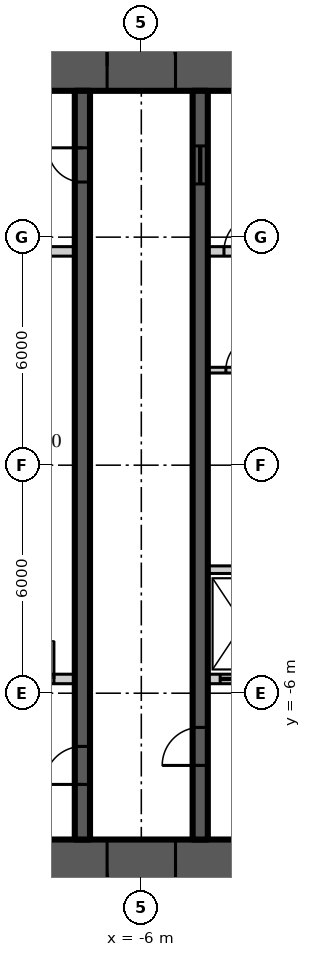
"""IFC4 building model, lengths in metres.
Left out: names, types, materials, properties, quantities, classifications, styles, units other than length and angle.
Written with IfcOpenShell. Run it as: python <this file> out.ifc"""

import sys

from ifc_helpers import new_model, si_unit, direction, frame, frame_2d, origin, place, context, subcontext, project, spatial, rectangle, extrude, element, fill, save


model = new_model("IFC4")
c1 = context("Model", 3, precision=1e-05, world=origin(), true_north=direction((0.0, 1.0)))
c2 = subcontext(c1, "Body", "Model", "MODEL_VIEW")
j1 = project(units=[si_unit("LENGTHUNIT", "METRE"), si_unit("PLANEANGLEUNIT", "RADIAN")], contexts=[c1])
p1 = place(None, origin())
s1 = spatial("IfcSite", under=j1, at=p1, CompositionType="ELEMENT")
p2 = place(p1, origin())
s2 = spatial("IfcBuilding", under=s1, at=p2, CompositionType="ELEMENT")
p3 = place(p2, frame((0.0, 0.0, 240.0)))
s3 = spatial("IfcBuildingStorey", under=s2, at=p3, CompositionType="ELEMENT", Elevation=240.0)
p4 = place(p3, frame((-11.15, 10.5, 0.0), z_axis=(0.0, 0.0, 1.0), x_axis=(1.0, 0.0, 0.0)))
e1 = element("IfcWall", 1, at=p4, inside=s3, PredefinedType="SHEAR", context=c2, shape_type="SweptSolid", body=[
    extrude(rectangle(XDim=22.3, YDim=1.3, at=frame_2d((11.15, 0.0))), origin(), (0.0, 0.0, 1.0), 3.9),
])
p5 = place(p4, frame((4.25, 0.0, 0.0)))
e2 = element("IfcOpeningElement", 2, at=p5, cuts=e1, PredefinedType="OPENING", context=c2, shape_type="SweptSolid", body=[
    extrude(rectangle(XDim=1.8, YDim=2.2, at=frame_2d((0.9, 1.1))), frame((0.0, 0.66, 0.0), z_axis=(0.0, -1.0, 0.0), x_axis=(1.0, 0.0, 0.0)), (0.0, 0.0, 1.0), 1.32),
])
p6 = place(p4, frame((16.25, 0.0, 0.0)))
e3 = element("IfcOpeningElement", 3, at=p6, cuts=e1, PredefinedType="OPENING", context=c2, shape_type="SweptSolid", body=[
    extrude(rectangle(XDim=1.8, YDim=2.2, at=frame_2d((0.9, 1.1))), frame((0.0, 0.66, 0.0), z_axis=(0.0, -1.0, 0.0), x_axis=(1.0, 0.0, 0.0)), (0.0, 0.0, 1.0), 1.32),
])
p7 = place(p3, frame((11.15, -10.5, 0.0), z_axis=(0.0, 0.0, 1.0), x_axis=(-1.0, 0.0, 0.0)))
e4 = element("IfcWall", 4, at=p7, inside=s3, PredefinedType="SHEAR", context=c2, shape_type="SweptSolid", body=[
    extrude(rectangle(XDim=22.3, YDim=1.3, at=frame_2d((11.15, 0.0))), origin(), (0.0, 0.0, 1.0), 3.9),
])
p8 = place(p7, frame((16.25, 0.0, 0.0)))
e5 = element("IfcOpeningElement", 5, at=p8, cuts=e4, PredefinedType="OPENING", context=c2, shape_type="SweptSolid", body=[
    extrude(rectangle(XDim=1.8, YDim=2.2, at=frame_2d((0.9, 1.1))), frame((0.0, 0.66, 0.0), z_axis=(0.0, -1.0, 0.0), x_axis=(1.0, 0.0, 0.0)), (0.0, 0.0, 1.0), 1.32),
])
p9 = place(p7, frame((4.25, 0.0, 0.0)))
e6 = element("IfcOpeningElement", 6, at=p9, cuts=e4, PredefinedType="OPENING", context=c2, shape_type="SweptSolid", body=[
    extrude(rectangle(XDim=1.8, YDim=2.2, at=frame_2d((0.9, 1.1))), frame((0.0, 0.66, 0.0), z_axis=(0.0, -1.0, 0.0), x_axis=(1.0, 0.0, 0.0)), (0.0, 0.0, 1.0), 1.32),
])
p10 = place(p3, frame((-7.55, -9.85, 0.0), z_axis=(0.0, 0.0, 1.0), x_axis=(0.0, 1.0, 0.0)))
e7 = element("IfcWall", 7, at=p10, inside=s3, PredefinedType="SHEAR", context=c2, shape_type="SweptSolid", body=[
    extrude(rectangle(XDim=19.7, YDim=0.4, at=frame_2d((9.85, 0.0))), origin(), (0.0, 0.0, 1.0), 3.9),
])
p11 = place(p10, frame((1.45, 0.0, 0.0)))
e8 = element("IfcOpeningElement", 8, at=p11, cuts=e7, PredefinedType="OPENING", context=c2, shape_type="SweptSolid", body=[
    extrude(rectangle(XDim=1.0, YDim=2.2, at=frame_2d((0.5, 1.1))), frame((0.0, 0.21, 0.0), z_axis=(0.0, -1.0, 0.0), x_axis=(1.0, 0.0, 0.0)), (0.0, 0.0, 1.0), 0.42),
])
p12 = place(p10, frame((17.3, 0.0, 0.0)))
e9 = element("IfcOpeningElement", 9, at=p12, cuts=e7, PredefinedType="OPENING", context=c2, shape_type="SweptSolid", body=[
    extrude(rectangle(XDim=0.9, YDim=2.1, at=frame_2d((0.45, 1.05))), frame((0.0, 0.21, 0.0), z_axis=(0.0, -1.0, 0.0), x_axis=(1.0, 0.0, 0.0)), (0.0, 0.0, 1.0), 0.42),
])
p13 = place(p3, frame((-4.45, -9.85, 0.0), z_axis=(0.0, 0.0, 1.0), x_axis=(0.0, 1.0, 0.0)))
e10 = element("IfcWall", 10, at=p13, inside=s3, PredefinedType="SHEAR", context=c2, shape_type="SweptSolid", body=[
    extrude(rectangle(XDim=19.7, YDim=0.4, at=frame_2d((9.85, 0.0))), origin(), (0.0, 0.0, 1.0), 3.9),
])
p14 = place(p13, frame((1.95, 0.0, 0.0)))
e11 = element("IfcOpeningElement", 11, at=p14, cuts=e10, PredefinedType="OPENING", context=c2, shape_type="SweptSolid", body=[
    extrude(rectangle(XDim=1.0, YDim=2.2, at=frame_2d((0.5, 1.1))), frame((0.0, 0.21, 0.0), z_axis=(0.0, -1.0, 0.0), x_axis=(1.0, 0.0, 0.0)), (0.0, 0.0, 1.0), 0.42),
])
p15 = place(p13, frame((17.25, 0.0, 0.0)))
e12 = element("IfcOpeningElement", 12, at=p15, cuts=e10, PredefinedType="OPENING", context=c2, shape_type="SweptSolid", body=[
    extrude(rectangle(XDim=1.0, YDim=2.1, at=frame_2d((0.5, 1.05))), frame((0.0, 0.21, 0.0), z_axis=(0.0, -1.0, 0.0), x_axis=(1.0, 0.0, 0.0)), (0.0, 0.0, 1.0), 0.42),
])
p16 = place(p3, frame((-9.85, 5.625, 0.0), z_axis=(0.0, 0.0, 1.0), x_axis=(1.0, 0.0, 0.0)))
e13 = element("IfcWall", 13, at=p16, inside=s3, PredefinedType="SOLIDWALL", context=c2, shape_type="SweptSolid", body=[
    extrude(rectangle(XDim=2.1, YDim=0.25, at=frame_2d((1.05, 0.0))), origin(), (0.0, 0.0, 1.0), 3.7),
])
p17 = place(p3, frame((-4.25, 5.625, 0.0), z_axis=(0.0, 0.0, 1.0), x_axis=(1.0, 0.0, 0.0)))
e14 = element("IfcWall", 14, at=p17, inside=s3, PredefinedType="SOLIDWALL", context=c2, shape_type="SweptSolid", body=[
    extrude(rectangle(XDim=1.85, YDim=0.25, at=frame_2d((0.925, 0.0))), origin(), (0.0, 0.0, 1.0), 3.7),
])
p18 = place(p17, frame((0.425, 0.0, 0.0)))
e15 = element("IfcOpeningElement", 15, at=p18, cuts=e14, PredefinedType="OPENING", context=c2, shape_type="SweptSolid", body=[
    extrude(rectangle(XDim=1.0, YDim=2.2, at=frame_2d((0.5, 1.1))), frame((0.0, 0.135, 0.0), z_axis=(0.0, -1.0, 0.0), x_axis=(1.0, 0.0, 0.0)), (0.0, 0.0, 1.0), 0.27),
])
p19 = place(p3, frame((-9.85, -5.625, 0.0), z_axis=(0.0, 0.0, 1.0), x_axis=(1.0, 0.0, 0.0)))
e16 = element("IfcWall", 16, at=p19, inside=s3, PredefinedType="SOLIDWALL", context=c2, shape_type="SweptSolid", body=[
    extrude(rectangle(XDim=2.1, YDim=0.25, at=frame_2d((1.05, 0.0))), origin(), (0.0, 0.0, 1.0), 3.7),
])
p20 = place(p19, frame((0.55, 0.0, 0.0)))
e17 = element("IfcOpeningElement", 17, at=p20, cuts=e16, PredefinedType="OPENING", context=c2, shape_type="SweptSolid", body=[
    extrude(rectangle(XDim=1.0, YDim=2.2, at=frame_2d((0.5, 1.1))), frame((0.0, 0.135, 0.0), z_axis=(0.0, -1.0, 0.0), x_axis=(1.0, 0.0, 0.0)), (0.0, 0.0, 1.0), 0.27),
])
p21 = place(p3, frame((-4.25, -5.625, 0.0), z_axis=(0.0, 0.0, 1.0), x_axis=(1.0, 0.0, 0.0)))
e18 = element("IfcWall", 18, at=p21, inside=s3, PredefinedType="SOLIDWALL", context=c2, shape_type="SweptSolid", body=[
    extrude(rectangle(XDim=1.85, YDim=0.25, at=frame_2d((0.925, 0.0))), origin(), (0.0, 0.0, 1.0), 3.7),
])
p22 = place(p21, frame((0.325, 0.0, 0.0)))
e19 = element("IfcOpeningElement", 19, at=p22, cuts=e18, PredefinedType="OPENING", context=c2, shape_type="SweptSolid", body=[
    extrude(rectangle(XDim=1.2, YDim=2.2, at=frame_2d((0.6, 1.1))), frame((0.0, 0.135, 0.0), z_axis=(0.0, -1.0, 0.0), x_axis=(1.0, 0.0, 0.0)), (0.0, 0.0, 1.0), 0.27),
])
p23 = place(p3, frame((-4.25, -2.75, 0.0), z_axis=(0.0, 0.0, 1.0), x_axis=(1.0, 0.0, 0.0)))
e20 = element("IfcWall", 20, at=p23, inside=s3, PredefinedType="SOLIDWALL", context=c2, shape_type="SweptSolid", body=[
    extrude(rectangle(XDim=1.85, YDim=0.2, at=frame_2d((0.925, 0.0))), origin(), (0.0, 0.0, 1.0), 3.7),
])
p24 = place(p3, frame((-4.25, 2.5, 0.0), z_axis=(0.0, 0.0, 1.0), x_axis=(1.0, 0.0, 0.0)))
e21 = element("IfcWall", 21, at=p24, inside=s3, PredefinedType="SOLIDWALL", context=c2, shape_type="SweptSolid", body=[
    extrude(rectangle(XDim=1.85, YDim=0.15, at=frame_2d((0.925, 0.0))), origin(), (0.0, 0.0, 1.0), 3.77),
])
p25 = place(p24, frame((0.475, 0.0, 0.0)))
e22 = element("IfcOpeningElement", 22, at=p25, cuts=e21, PredefinedType="OPENING", context=c2, shape_type="SweptSolid", body=[
    extrude(rectangle(XDim=0.9, YDim=2.1, at=frame_2d((0.45, 1.05))), frame((0.0, 0.085, 0.0), z_axis=(0.0, -1.0, 0.0), x_axis=(1.0, 0.0, 0.0)), (0.0, 0.0, 1.0), 0.17),
])
p26 = place(p5, origin())
e23 = element("IfcDoor", 23, at=p26, inside=s3, OperationType="DOUBLE_DOOR_DOUBLE_SWING", PredefinedType="DOOR", context=c2, shape_type="SweptSolid", body=[
    extrude(rectangle(XDim=1.8, YDim=2.2, at=frame_2d((0.9, 1.1))), frame((0.0, 0.025, 0.0), z_axis=(0.0, -1.0, 0.0), x_axis=(1.0, 0.0, 0.0)), (0.0, 0.0, 1.0), 0.05),
])
fill(e2, e23)
p27 = place(p8, origin())
e24 = element("IfcDoor", 24, at=p27, inside=s3, OperationType="DOUBLE_DOOR_DOUBLE_SWING", PredefinedType="DOOR", context=c2, shape_type="SweptSolid", body=[
    extrude(rectangle(XDim=1.8, YDim=2.2, at=frame_2d((0.9, 1.1))), frame((0.0, 0.025, 0.0), z_axis=(0.0, -1.0, 0.0), x_axis=(1.0, 0.0, 0.0)), (0.0, 0.0, 1.0), 0.05),
])
fill(e5, e24)
p28 = place(p11, origin())
e25 = element("IfcDoor", 25, at=p28, inside=s3, OperationType="SINGLE_SWING_LEFT", PredefinedType="DOOR", context=c2, shape_type="SweptSolid", body=[
    extrude(rectangle(XDim=1.0, YDim=2.2, at=frame_2d((0.5, 1.1))), frame((0.0, 0.025, 0.0), z_axis=(0.0, -1.0, 0.0), x_axis=(1.0, 0.0, 0.0)), (0.0, 0.0, 1.0), 0.05),
])
fill(e8, e25)
p29 = place(p14, origin())
e26 = element("IfcDoor", 26, at=p29, inside=s3, OperationType="SINGLE_SWING_LEFT", PredefinedType="DOOR", context=c2, shape_type="SweptSolid", body=[
    extrude(rectangle(XDim=1.0, YDim=2.2, at=frame_2d((0.5, 1.1))), frame((0.0, 0.025, 0.0), z_axis=(0.0, -1.0, 0.0), x_axis=(1.0, 0.0, 0.0)), (0.0, 0.0, 1.0), 0.05),
])
fill(e11, e26)
p30 = place(p12, origin())
e27 = element("IfcDoor", 27, at=p30, inside=s3, OperationType="SINGLE_SWING_RIGHT", PredefinedType="DOOR", context=c2, shape_type="SweptSolid", body=[
    extrude(rectangle(XDim=0.9, YDim=2.1, at=frame_2d((0.45, 1.05))), frame((0.0, 0.025, 0.0), z_axis=(0.0, -1.0, 0.0), x_axis=(1.0, 0.0, 0.0)), (0.0, 0.0, 1.0), 0.05),
])
fill(e9, e27)
p31 = place(p15, origin())
e28 = element("IfcDoor", 28, at=p31, inside=s3, OperationType="SLIDING_TO_LEFT", PredefinedType="DOOR", context=c2, shape_type="SweptSolid", body=[
    extrude(rectangle(XDim=1.0, YDim=2.1, at=frame_2d((0.5, 1.05))), frame((0.0, 0.025, 0.0), z_axis=(0.0, -1.0, 0.0), x_axis=(1.0, 0.0, 0.0)), (0.0, 0.0, 1.0), 0.05),
])
fill(e12, e28)
p32 = place(p22, origin())
e29 = element("IfcDoor", 29, at=p32, inside=s3, OperationType="SLIDING_TO_LEFT", PredefinedType="DOOR", context=c2, shape_type="SweptSolid", body=[
    extrude(rectangle(XDim=1.2, YDim=2.2, at=frame_2d((0.6, 1.1))), frame((0.0, 0.025, 0.0), z_axis=(0.0, -1.0, 0.0), x_axis=(1.0, 0.0, 0.0)), (0.0, 0.0, 1.0), 0.05),
])
fill(e19, e29)
p33 = place(p20, origin())
e30 = element("IfcDoor", 30, at=p33, inside=s3, OperationType="SINGLE_SWING_RIGHT", PredefinedType="DOOR", context=c2, shape_type="SweptSolid", body=[
    extrude(rectangle(XDim=1.0, YDim=2.2, at=frame_2d((0.5, 1.1))), frame((0.0, 0.025, 0.0), z_axis=(0.0, -1.0, 0.0), x_axis=(1.0, 0.0, 0.0)), (0.0, 0.0, 1.0), 0.05),
])
fill(e17, e30)
p34 = place(p25, origin())
e31 = element("IfcDoor", 31, at=p34, inside=s3, OperationType="SINGLE_SWING_RIGHT", PredefinedType="DOOR", context=c2, shape_type="SweptSolid", body=[
    extrude(rectangle(XDim=0.9, YDim=2.1, at=frame_2d((0.45, 1.05))), frame((0.0, 0.025, 0.0), z_axis=(0.0, -1.0, 0.0), x_axis=(1.0, 0.0, 0.0)), (0.0, 0.0, 1.0), 0.05),
])
fill(e22, e31)
p35 = place(p18, origin())
e32 = element("IfcDoor", 32, at=p35, inside=s3, OperationType="SINGLE_SWING_RIGHT", PredefinedType="DOOR", context=c2, shape_type="SweptSolid", body=[
    extrude(rectangle(XDim=1.0, YDim=2.2, at=frame_2d((0.5, 1.1))), frame((0.0, 0.025, 0.0), z_axis=(0.0, -1.0, 0.0), x_axis=(1.0, 0.0, 0.0)), (0.0, 0.0, 1.0), 0.05),
])
fill(e15, e32)
save(model, sys.argv[1])
